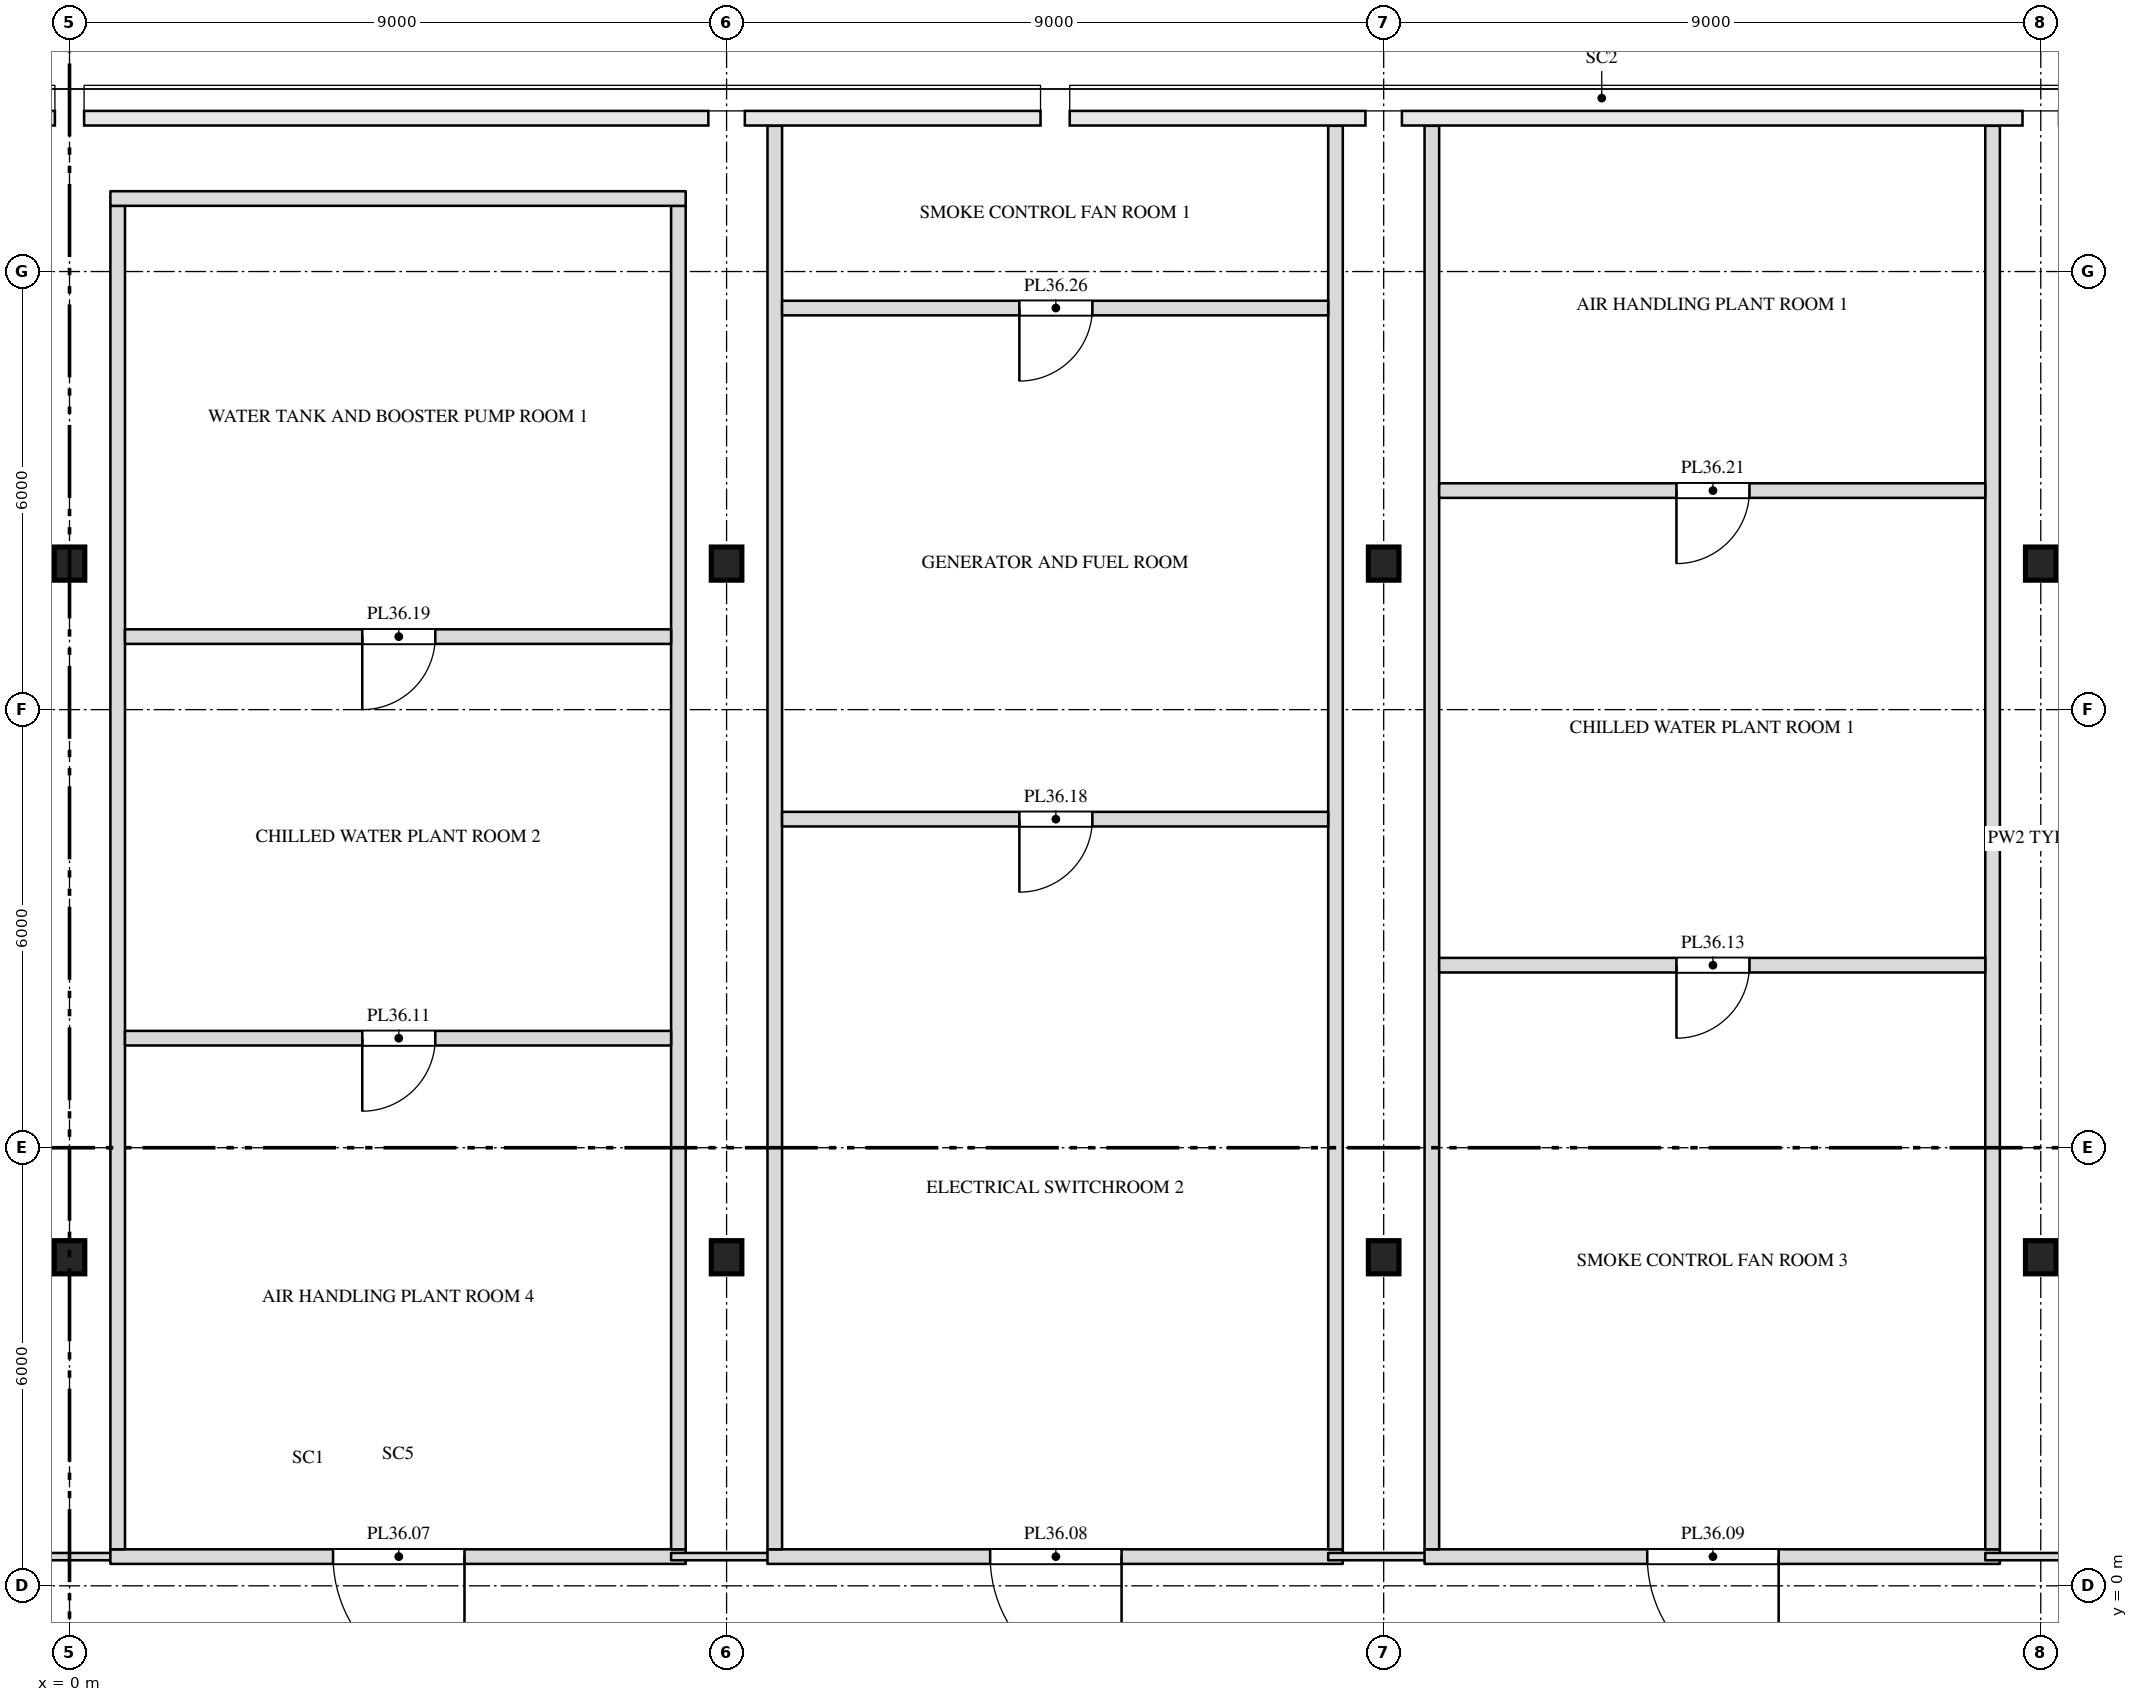
"""IFC4 building model, lengths in metres.
Left out: names, types, materials, properties, quantities, classifications, styles, units other than length and angle.
Written with IfcOpenShell. Run it as: python <this file> out.ifc"""

import sys

from ifc_helpers import new_model, si_unit, direction, frame, frame_2d, origin, origin_2d, place, context, subcontext, project, spatial, rectangle, i_section, extrude, element, fill, save


model = new_model("IFC4")
c1 = context("Model", 3, precision=1e-05, world=origin(), true_north=direction((0.0, 1.0)))
c2 = subcontext(c1, "Body", "Model", "MODEL_VIEW")
j1 = project(units=[si_unit("LENGTHUNIT", "METRE"), si_unit("PLANEANGLEUNIT", "RADIAN")], contexts=[c1])
p1 = place(None, origin())
s1 = spatial("IfcSite", under=j1, at=p1, CompositionType="ELEMENT")
p2 = place(p1, origin())
s2 = spatial("IfcBuilding", under=s1, at=p2, CompositionType="ELEMENT")
p3 = place(p2, frame((0.0, 0.0, 160.5)))
s3 = spatial("IfcBuildingStorey", under=s2, at=p3, CompositionType="ELEMENT", Elevation=160.5)
for number, where, z_axis, x_axis in (
    (1, (0.0, 4.5, 0.0), (0.0, 0.0, 1.0), (1.0, 0.0, 0.0)),
    (2, (9.0, 4.5, 0.0), (0.0, 0.0, 1.0), (1.0, 0.0, 0.0)),
    (3, (18.0, 4.5, 0.0), (0.0, 0.0, 1.0), (1.0, 0.0, 0.0)),
    (4, (27.0, 4.5, 0.0), (0.0, 0.0, 1.0), (1.0, 0.0, 0.0)),
    (5, (0.0, 14.0, 0.0), (0.0, 0.0, 1.0), (1.0, 0.0, 0.0)),
    (6, (9.0, 14.0, 0.0), (0.0, 0.0, 1.0), (1.0, 0.0, 0.0)),
    (7, (18.0, 14.0, 0.0), (0.0, 0.0, 1.0), (1.0, 0.0, 0.0)),
    (8, (27.0, 14.0, 0.0), (0.0, 0.0, 1.0), (1.0, 0.0, 0.0)),
):
    element("IfcColumn", number, at=place(p3, frame(where, z_axis=z_axis, x_axis=x_axis)), inside=s3, PredefinedType="COLUMN", context=c2, shape_type="SweptSolid", body=[
        extrude(i_section(OverallWidth=0.419, OverallDepth=0.455, WebThickness=0.042, FlangeThickness=0.068, at=origin_2d()), origin(), (0.0, 0.0, 1.0), 4.0),
    ])
p4 = place(p3, frame((-0.76, 0.4, 0.0), z_axis=(0.0, 0.0, 1.0), x_axis=(1.0, 0.0, 0.0)))
e9 = element("IfcWall", 9, at=p4, inside=s3, PredefinedType="PARTITIONING", context=c2, shape_type="SweptSolid", body=[
    extrude(rectangle(XDim=1.52, YDim=0.1, at=frame_2d((0.76, 0.0))), origin(), (0.0, 0.0, 1.0), 3.8),
])
p5 = place(p3, frame((0.56, 0.4, 0.0), z_axis=(0.0, 0.0, 1.0), x_axis=(1.0, 0.0, 0.0)))
e10 = element("IfcWall", 10, at=p5, inside=s3, PredefinedType="PARTITIONING", context=c2, shape_type="SweptSolid", body=[
    extrude(rectangle(XDim=7.88, YDim=0.2, at=frame_2d((3.94, 0.0))), origin(), (0.0, 0.0, 1.0), 3.8),
])
p6 = place(p5, frame((3.05, 0.0, 0.0)))
e11 = element("IfcOpeningElement", 11, at=p6, cuts=e10, PredefinedType="OPENING", context=c2, shape_type="SweptSolid", body=[
    extrude(rectangle(XDim=1.8, YDim=2.1, at=frame_2d((0.9, 1.05))), frame((0.0, 0.112, 0.0), z_axis=(0.0, -1.0, 0.0), x_axis=(1.0, 0.0, 0.0)), (0.0, 0.0, 1.0), 0.224),
])
p7 = place(p3, frame((0.66, 0.5, 0.0), z_axis=(0.0, 0.0, 1.0), x_axis=(0.0, 1.0, 0.0)))
e12 = element("IfcWall", 12, at=p7, inside=s3, PredefinedType="PARTITIONING", context=c2, shape_type="SweptSolid", body=[
    extrude(rectangle(XDim=18.4, YDim=0.2, at=frame_2d((9.2, 0.0))), origin(), (0.0, 0.0, 1.0), 3.8),
])
p8 = place(p3, frame((8.24, 0.4, 0.0), z_axis=(0.0, 0.0, 1.0), x_axis=(1.0, 0.0, 0.0)))
e13 = element("IfcWall", 13, at=p8, inside=s3, PredefinedType="PARTITIONING", context=c2, shape_type="SweptSolid", body=[
    extrude(rectangle(XDim=1.52, YDim=0.1, at=frame_2d((0.76, 0.0))), origin(), (0.0, 0.0, 1.0), 3.8),
])
p9 = place(p3, frame((8.34, 0.5, 0.0), z_axis=(0.0, 0.0, 1.0), x_axis=(0.0, 1.0, 0.0)))
e14 = element("IfcWall", 14, at=p9, inside=s3, PredefinedType="PARTITIONING", context=c2, shape_type="SweptSolid", body=[
    extrude(rectangle(XDim=18.4, YDim=0.2, at=frame_2d((9.2, 0.0))), origin(), (0.0, 0.0, 1.0), 3.8),
])
p10 = place(p3, frame((9.56, 0.4, 0.0), z_axis=(0.0, 0.0, 1.0), x_axis=(1.0, 0.0, 0.0)))
e15 = element("IfcWall", 15, at=p10, inside=s3, PredefinedType="PARTITIONING", context=c2, shape_type="SweptSolid", body=[
    extrude(rectangle(XDim=7.88, YDim=0.2, at=frame_2d((3.94, 0.0))), origin(), (0.0, 0.0, 1.0), 3.8),
])
p11 = place(p10, frame((3.05, 0.0, 0.0)))
e16 = element("IfcOpeningElement", 16, at=p11, cuts=e15, PredefinedType="OPENING", context=c2, shape_type="SweptSolid", body=[
    extrude(rectangle(XDim=1.8, YDim=2.1, at=frame_2d((0.9, 1.05))), frame((0.0, 0.112, 0.0), z_axis=(0.0, -1.0, 0.0), x_axis=(1.0, 0.0, 0.0)), (0.0, 0.0, 1.0), 0.224),
])
p12 = place(p3, frame((9.66, 0.5, 0.0), z_axis=(0.0, 0.0, 1.0), x_axis=(0.0, 1.0, 0.0)))
e17 = element("IfcWall", 17, at=p12, inside=s3, PredefinedType="PARTITIONING", context=c2, shape_type="SweptSolid", body=[
    extrude(rectangle(XDim=19.496, YDim=0.2, at=frame_2d((9.748, 0.0))), origin(), (0.0, 0.0, 1.0), 3.8),
])
p13 = place(p3, frame((17.24, 0.4, 0.0), z_axis=(0.0, 0.0, 1.0), x_axis=(1.0, 0.0, 0.0)))
e18 = element("IfcWall", 18, at=p13, inside=s3, PredefinedType="PARTITIONING", context=c2, shape_type="SweptSolid", body=[
    extrude(rectangle(XDim=1.52, YDim=0.1, at=frame_2d((0.76, 0.0))), origin(), (0.0, 0.0, 1.0), 3.8),
])
p14 = place(p3, frame((17.34, 0.5, 0.0), z_axis=(0.0, 0.0, 1.0), x_axis=(0.0, 1.0, 0.0)))
e19 = element("IfcWall", 19, at=p14, inside=s3, PredefinedType="PARTITIONING", context=c2, shape_type="SweptSolid", body=[
    extrude(rectangle(XDim=19.496, YDim=0.2, at=frame_2d((9.748, 0.0))), origin(), (0.0, 0.0, 1.0), 3.8),
])
p15 = place(p3, frame((18.56, 0.4, 0.0), z_axis=(0.0, 0.0, 1.0), x_axis=(1.0, 0.0, 0.0)))
e20 = element("IfcWall", 20, at=p15, inside=s3, PredefinedType="PARTITIONING", context=c2, shape_type="SweptSolid", body=[
    extrude(rectangle(XDim=7.88, YDim=0.2, at=frame_2d((3.94, 0.0))), origin(), (0.0, 0.0, 1.0), 3.8),
])
p16 = place(p15, frame((3.05, 0.0, 0.0)))
e21 = element("IfcOpeningElement", 21, at=p16, cuts=e20, PredefinedType="OPENING", context=c2, shape_type="SweptSolid", body=[
    extrude(rectangle(XDim=1.8, YDim=2.1, at=frame_2d((0.9, 1.05))), frame((0.0, 0.112, 0.0), z_axis=(0.0, -1.0, 0.0), x_axis=(1.0, 0.0, 0.0)), (0.0, 0.0, 1.0), 0.224),
])
p17 = place(p3, frame((18.66, 0.5, 0.0), z_axis=(0.0, 0.0, 1.0), x_axis=(0.0, 1.0, 0.0)))
e22 = element("IfcWall", 22, at=p17, inside=s3, PredefinedType="PARTITIONING", context=c2, shape_type="SweptSolid", body=[
    extrude(rectangle(XDim=19.496, YDim=0.2, at=frame_2d((9.748, 0.0))), origin(), (0.0, 0.0, 1.0), 3.8),
])
p18 = place(p3, frame((26.24, 0.4, 0.0), z_axis=(0.0, 0.0, 1.0), x_axis=(1.0, 0.0, 0.0)))
e23 = element("IfcWall", 23, at=p18, inside=s3, PredefinedType="PARTITIONING", context=c2, shape_type="SweptSolid", body=[
    extrude(rectangle(XDim=1.435, YDim=0.1, at=frame_2d((0.718, 0.0))), origin(), (0.0, 0.0, 1.0), 3.8),
])
p19 = place(p3, frame((26.34, 0.5, 0.0), z_axis=(0.0, 0.0, 1.0), x_axis=(0.0, 1.0, 0.0)))
e24 = element("IfcWall", 24, at=p19, inside=s3, PredefinedType="PARTITIONING", context=c2, shape_type="SweptSolid", body=[
    extrude(rectangle(XDim=19.496, YDim=0.2, at=frame_2d((9.748, 0.0))), origin(), (0.0, 0.0, 1.0), 3.8),
])
p20 = place(p3, frame((0.76, 7.5, 0.0), z_axis=(0.0, 0.0, 1.0), x_axis=(1.0, 0.0, 0.0)))
e25 = element("IfcWall", 25, at=p20, inside=s3, PredefinedType="PARTITIONING", context=c2, shape_type="SweptSolid", body=[
    extrude(rectangle(XDim=7.48, YDim=0.2, at=frame_2d((3.74, 0.0))), origin(), (0.0, 0.0, 1.0), 3.8),
])
p21 = place(p20, frame((3.25, 0.0, 0.0)))
e26 = element("IfcOpeningElement", 26, at=p21, cuts=e25, PredefinedType="OPENING", context=c2, shape_type="SweptSolid", body=[
    extrude(rectangle(XDim=1.0, YDim=2.1, at=frame_2d((0.5, 1.05))), frame((0.0, 0.112, 0.0), z_axis=(0.0, -1.0, 0.0), x_axis=(1.0, 0.0, 0.0)), (0.0, 0.0, 1.0), 0.224),
])
p22 = place(p3, frame((18.76, 8.5, 0.0), z_axis=(0.0, 0.0, 1.0), x_axis=(1.0, 0.0, 0.0)))
e27 = element("IfcWall", 27, at=p22, inside=s3, PredefinedType="PARTITIONING", context=c2, shape_type="SweptSolid", body=[
    extrude(rectangle(XDim=7.48, YDim=0.2, at=frame_2d((3.74, 0.0))), origin(), (0.0, 0.0, 1.0), 3.8),
])
p23 = place(p22, frame((3.25, 0.0, 0.0)))
e28 = element("IfcOpeningElement", 28, at=p23, cuts=e27, PredefinedType="OPENING", context=c2, shape_type="SweptSolid", body=[
    extrude(rectangle(XDim=1.0, YDim=2.1, at=frame_2d((0.5, 1.05))), frame((0.0, 0.112, 0.0), z_axis=(0.0, -1.0, 0.0), x_axis=(1.0, 0.0, 0.0)), (0.0, 0.0, 1.0), 0.224),
])
p24 = place(p3, frame((9.76, 10.5, 0.0), z_axis=(0.0, 0.0, 1.0), x_axis=(1.0, 0.0, 0.0)))
e29 = element("IfcWall", 29, at=p24, inside=s3, PredefinedType="PARTITIONING", context=c2, shape_type="SweptSolid", body=[
    extrude(rectangle(XDim=7.48, YDim=0.2, at=frame_2d((3.74, 0.0))), origin(), (0.0, 0.0, 1.0), 3.8),
])
p25 = place(p24, frame((3.25, 0.0, 0.0)))
e30 = element("IfcOpeningElement", 30, at=p25, cuts=e29, PredefinedType="OPENING", context=c2, shape_type="SweptSolid", body=[
    extrude(rectangle(XDim=1.0, YDim=2.1, at=frame_2d((0.5, 1.05))), frame((0.0, 0.112, 0.0), z_axis=(0.0, -1.0, 0.0), x_axis=(1.0, 0.0, 0.0)), (0.0, 0.0, 1.0), 0.224),
])
p26 = place(p3, frame((0.76, 13.0, 0.0), z_axis=(0.0, 0.0, 1.0), x_axis=(1.0, 0.0, 0.0)))
e31 = element("IfcWall", 31, at=p26, inside=s3, PredefinedType="PARTITIONING", context=c2, shape_type="SweptSolid", body=[
    extrude(rectangle(XDim=7.48, YDim=0.2, at=frame_2d((3.74, 0.0))), origin(), (0.0, 0.0, 1.0), 3.8),
])
p27 = place(p26, frame((3.25, 0.0, 0.0)))
e32 = element("IfcOpeningElement", 32, at=p27, cuts=e31, PredefinedType="OPENING", context=c2, shape_type="SweptSolid", body=[
    extrude(rectangle(XDim=1.0, YDim=2.1, at=frame_2d((0.5, 1.05))), frame((0.0, 0.112, 0.0), z_axis=(0.0, -1.0, 0.0), x_axis=(1.0, 0.0, 0.0)), (0.0, 0.0, 1.0), 0.224),
])
p28 = place(p3, frame((18.76, 15.0, 0.0), z_axis=(0.0, 0.0, 1.0), x_axis=(1.0, 0.0, 0.0)))
e33 = element("IfcWall", 33, at=p28, inside=s3, PredefinedType="PARTITIONING", context=c2, shape_type="SweptSolid", body=[
    extrude(rectangle(XDim=7.48, YDim=0.2, at=frame_2d((3.74, 0.0))), origin(), (0.0, 0.0, 1.0), 3.8),
])
p29 = place(p28, frame((3.25, 0.0, 0.0)))
e34 = element("IfcOpeningElement", 34, at=p29, cuts=e33, PredefinedType="OPENING", context=c2, shape_type="SweptSolid", body=[
    extrude(rectangle(XDim=1.0, YDim=2.1, at=frame_2d((0.5, 1.05))), frame((0.0, 0.112, 0.0), z_axis=(0.0, -1.0, 0.0), x_axis=(1.0, 0.0, 0.0)), (0.0, 0.0, 1.0), 0.224),
])
p30 = place(p3, frame((9.76, 17.5, 0.0), z_axis=(0.0, 0.0, 1.0), x_axis=(1.0, 0.0, 0.0)))
e35 = element("IfcWall", 35, at=p30, inside=s3, PredefinedType="PARTITIONING", context=c2, shape_type="SweptSolid", body=[
    extrude(rectangle(XDim=7.48, YDim=0.2, at=frame_2d((3.74, 0.0))), origin(), (0.0, 0.0, 1.0), 3.8),
])
p31 = place(p30, frame((3.25, 0.0, 0.0)))
e36 = element("IfcOpeningElement", 36, at=p31, cuts=e35, PredefinedType="OPENING", context=c2, shape_type="SweptSolid", body=[
    extrude(rectangle(XDim=1.0, YDim=2.1, at=frame_2d((0.5, 1.05))), frame((0.0, 0.112, 0.0), z_axis=(0.0, -1.0, 0.0), x_axis=(1.0, 0.0, 0.0)), (0.0, 0.0, 1.0), 0.224),
])
p32 = place(p3, frame((0.56, 19.0, 0.0), z_axis=(0.0, 0.0, 1.0), x_axis=(1.0, 0.0, 0.0)))
e37 = element("IfcWall", 37, at=p32, inside=s3, PredefinedType="PARTITIONING", context=c2, shape_type="SweptSolid", body=[
    extrude(rectangle(XDim=7.88, YDim=0.2, at=frame_2d((3.94, 0.0))), origin(), (0.0, 0.0, 1.0), 3.8),
])
p33 = place(p6, origin())
e38 = element("IfcDoor", 38, at=p33, inside=s3, OperationType="DOUBLE_DOOR_SINGLE_SWING", PredefinedType="DOOR", context=c2, shape_type="SweptSolid", body=[
    extrude(rectangle(XDim=1.8, YDim=2.1, at=frame_2d((0.9, 1.05))), frame((0.0, 0.025, 0.0), z_axis=(0.0, -1.0, 0.0), x_axis=(1.0, 0.0, 0.0)), (0.0, 0.0, 1.0), 0.05),
])
fill(e11, e38)
p34 = place(p11, origin())
e39 = element("IfcDoor", 39, at=p34, inside=s3, OperationType="DOUBLE_DOOR_SINGLE_SWING", PredefinedType="DOOR", context=c2, shape_type="SweptSolid", body=[
    extrude(rectangle(XDim=1.8, YDim=2.1, at=frame_2d((0.9, 1.05))), frame((0.0, 0.025, 0.0), z_axis=(0.0, -1.0, 0.0), x_axis=(1.0, 0.0, 0.0)), (0.0, 0.0, 1.0), 0.05),
])
fill(e16, e39)
p35 = place(p16, origin())
e40 = element("IfcDoor", 40, at=p35, inside=s3, OperationType="DOUBLE_DOOR_SINGLE_SWING", PredefinedType="DOOR", context=c2, shape_type="SweptSolid", body=[
    extrude(rectangle(XDim=1.8, YDim=2.1, at=frame_2d((0.9, 1.05))), frame((0.0, 0.025, 0.0), z_axis=(0.0, -1.0, 0.0), x_axis=(1.0, 0.0, 0.0)), (0.0, 0.0, 1.0), 0.05),
])
fill(e21, e40)
p36 = place(p21, origin())
e41 = element("IfcDoor", 41, at=p36, inside=s3, OperationType="SINGLE_SWING_RIGHT", PredefinedType="DOOR", context=c2, shape_type="SweptSolid", body=[
    extrude(rectangle(XDim=1.0, YDim=2.1, at=frame_2d((0.5, 1.05))), frame((0.0, 0.025, 0.0), z_axis=(0.0, -1.0, 0.0), x_axis=(1.0, 0.0, 0.0)), (0.0, 0.0, 1.0), 0.05),
])
fill(e26, e41)
p37 = place(p23, origin())
e42 = element("IfcDoor", 42, at=p37, inside=s3, OperationType="SINGLE_SWING_RIGHT", PredefinedType="DOOR", context=c2, shape_type="SweptSolid", body=[
    extrude(rectangle(XDim=1.0, YDim=2.1, at=frame_2d((0.5, 1.05))), frame((0.0, 0.025, 0.0), z_axis=(0.0, -1.0, 0.0), x_axis=(1.0, 0.0, 0.0)), (0.0, 0.0, 1.0), 0.05),
])
fill(e28, e42)
p38 = place(p25, origin())
e43 = element("IfcDoor", 43, at=p38, inside=s3, OperationType="SINGLE_SWING_RIGHT", PredefinedType="DOOR", context=c2, shape_type="SweptSolid", body=[
    extrude(rectangle(XDim=1.0, YDim=2.1, at=frame_2d((0.5, 1.05))), frame((0.0, 0.025, 0.0), z_axis=(0.0, -1.0, 0.0), x_axis=(1.0, 0.0, 0.0)), (0.0, 0.0, 1.0), 0.05),
])
fill(e30, e43)
p39 = place(p27, origin())
e44 = element("IfcDoor", 44, at=p39, inside=s3, OperationType="SINGLE_SWING_RIGHT", PredefinedType="DOOR", context=c2, shape_type="SweptSolid", body=[
    extrude(rectangle(XDim=1.0, YDim=2.1, at=frame_2d((0.5, 1.05))), frame((0.0, 0.025, 0.0), z_axis=(0.0, -1.0, 0.0), x_axis=(1.0, 0.0, 0.0)), (0.0, 0.0, 1.0), 0.05),
])
fill(e32, e44)
p40 = place(p29, origin())
e45 = element("IfcDoor", 45, at=p40, inside=s3, OperationType="SINGLE_SWING_RIGHT", PredefinedType="DOOR", context=c2, shape_type="SweptSolid", body=[
    extrude(rectangle(XDim=1.0, YDim=2.1, at=frame_2d((0.5, 1.05))), frame((0.0, 0.025, 0.0), z_axis=(0.0, -1.0, 0.0), x_axis=(1.0, 0.0, 0.0)), (0.0, 0.0, 1.0), 0.05),
])
fill(e34, e45)
p41 = place(p31, origin())
e46 = element("IfcDoor", 46, at=p41, inside=s3, OperationType="SINGLE_SWING_RIGHT", PredefinedType="DOOR", context=c2, shape_type="SweptSolid", body=[
    extrude(rectangle(XDim=1.0, YDim=2.1, at=frame_2d((0.5, 1.05))), frame((0.0, 0.025, 0.0), z_axis=(0.0, -1.0, 0.0), x_axis=(1.0, 0.0, 0.0)), (0.0, 0.0, 1.0), 0.05),
])
fill(e36, e46)
save(model, sys.argv[1])
